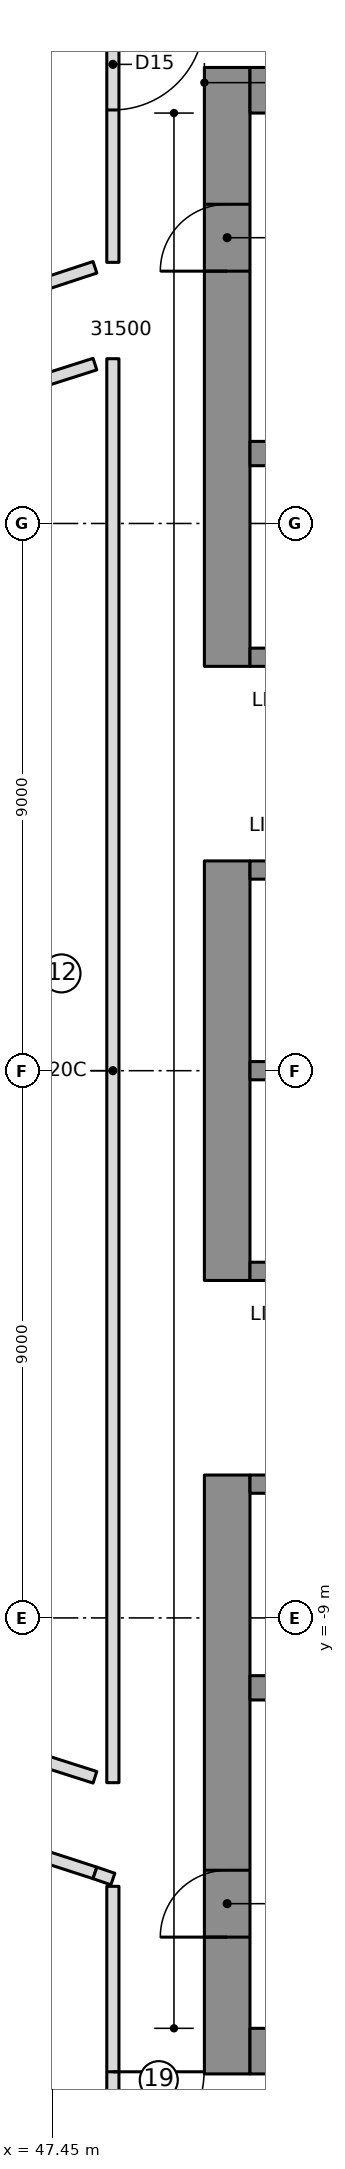
"""IFC4 building model, lengths in metres.
Left out: names, types, materials, properties, quantities, classifications, styles, units other than length and angle.
Written with IfcOpenShell. Run it as: python <this file> out.ifc"""

import sys

from ifc_helpers import new_model, si_unit, direction, frame, frame_2d, origin, place, context, subcontext, project, spatial, rectangle, extrude, element, fill, save


model = new_model("IFC4")
c1 = context("Model", 3, precision=1e-05, world=origin(), true_north=direction((0.0, 1.0)))
c2 = subcontext(c1, "Body", "Model", "MODEL_VIEW")
j1 = project(units=[si_unit("LENGTHUNIT", "METRE"), si_unit("PLANEANGLEUNIT", "RADIAN")], contexts=[c1])
p1 = place(None, origin())
s1 = spatial("IfcSite", under=j1, at=p1, CompositionType="ELEMENT")
p2 = place(p1, origin())
s2 = spatial("IfcBuilding", under=s1, at=p2, CompositionType="ELEMENT")
p3 = place(p2, frame((0.0, 0.0, 182.6)))
s3 = spatial("IfcBuildingStorey", under=s2, at=p3, CompositionType="ELEMENT", Elevation=182.6)
p4 = place(p3, frame((50.325, 6.65, 0.0), z_axis=(0.0, 0.0, 1.0), x_axis=(0.0, 1.0, 0.0)))
e1 = element("IfcWall", 1, at=p4, inside=s3, PredefinedType="SHEAR", context=c2, shape_type="SweptSolid", body=[
    extrude(rectangle(XDim=9.85, YDim=0.75, at=frame_2d((4.925, 0.0))), origin(), (0.0, 0.0, 1.0), 3.55),
])
p5 = place(p4, frame((6.5, 0.0, 0.0)))
e2 = element("IfcOpeningElement", 2, at=p5, cuts=e1, PredefinedType="OPENING", context=c2, shape_type="SweptSolid", body=[
    extrude(rectangle(XDim=1.1, YDim=2.1, at=frame_2d((0.55, 1.05))), frame((0.0, 0.385, 0.0), z_axis=(0.0, -1.0, 0.0), x_axis=(1.0, 0.0, 0.0)), (0.0, 0.0, 1.0), 0.77),
])
p6 = place(p3, frame((50.325, -3.45, 0.0), z_axis=(0.0, 0.0, 1.0), x_axis=(0.0, 1.0, 0.0)))
e3 = element("IfcWall", 3, at=p6, inside=s3, PredefinedType="SHEAR", context=c2, shape_type="SweptSolid", body=[
    extrude(rectangle(XDim=6.9, YDim=0.75, at=frame_2d((3.45, 0.0))), origin(), (0.0, 0.0, 1.0), 3.55),
])
p7 = place(p3, frame((50.325, -16.5, 0.0), z_axis=(0.0, 0.0, 1.0), x_axis=(0.0, 1.0, 0.0)))
e4 = element("IfcWall", 4, at=p7, inside=s3, PredefinedType="SHEAR", context=c2, shape_type="SweptSolid", body=[
    extrude(rectangle(XDim=9.85, YDim=0.75, at=frame_2d((4.925, 0.0))), origin(), (0.0, 0.0, 1.0), 3.55),
])
p8 = place(p7, frame((2.25, 0.0, 0.0)))
e5 = element("IfcOpeningElement", 5, at=p8, cuts=e4, PredefinedType="OPENING", context=c2, shape_type="SweptSolid", body=[
    extrude(rectangle(XDim=1.1, YDim=2.1, at=frame_2d((0.55, 1.05))), frame((0.0, 0.385, 0.0), z_axis=(0.0, -1.0, 0.0), x_axis=(1.0, 0.0, 0.0)), (0.0, 0.0, 1.0), 0.77),
])
for number, where, z_axis, x_axis in (
    (6, (50.7, 16.125, 0.0), (0.0, 0.0, 1.0), (1.0, 0.0, 0.0)),
    (7, (50.7, -16.125, 0.0), (0.0, 0.0, 1.0), (1.0, 0.0, 0.0)),
):
    element("IfcWall", number, at=place(p3, frame(where, z_axis=z_axis, x_axis=x_axis)), inside=s3, PredefinedType="SHEAR", context=c2, shape_type="SweptSolid", body=[
        extrude(rectangle(XDim=13.77, YDim=0.75, at=frame_2d((6.885, 0.0))), origin(), (0.0, 0.0, 1.0), 3.55),
    ])
p9 = place(p3, frame((50.7, 10.15, 0.0), z_axis=(0.0, 0.0, 1.0), x_axis=(1.0, 0.0, 0.0)))
e8 = element("IfcWall", 8, at=p9, inside=s3, PredefinedType="SHEAR", context=c2, shape_type="SweptSolid", body=[
    extrude(rectangle(XDim=13.02, YDim=0.4, at=frame_2d((6.51, 0.0))), origin(), (0.0, 0.0, 1.0), 3.55),
])
p10 = place(p9, frame((0.7, 0.0, 0.0)))
e9 = element("IfcOpeningElement", 9, at=p10, cuts=e8, PredefinedType="OPENING", context=c2, shape_type="SweptSolid", body=[
    extrude(rectangle(XDim=1.1, YDim=2.1, at=frame_2d((0.55, 1.05))), frame((0.0, 0.21, 0.0), z_axis=(0.0, -1.0, 0.0), x_axis=(1.0, 0.0, 0.0)), (0.0, 0.0, 1.0), 0.42),
])
p11 = place(p9, frame((3.5, 0.0, 0.0)))
e10 = element("IfcOpeningElement", 10, at=p11, cuts=e8, PredefinedType="OPENING", context=c2, shape_type="SweptSolid", body=[
    extrude(rectangle(XDim=1.1, YDim=2.1, at=frame_2d((0.55, 1.05))), frame((0.0, 0.21, 0.0), z_axis=(0.0, -1.0, 0.0), x_axis=(1.0, 0.0, 0.0)), (0.0, 0.0, 1.0), 0.42),
])
p12 = place(p3, frame((50.7, -10.15, 0.0), z_axis=(0.0, 0.0, 1.0), x_axis=(1.0, 0.0, 0.0)))
e11 = element("IfcWall", 11, at=p12, inside=s3, PredefinedType="SHEAR", context=c2, shape_type="SweptSolid", body=[
    extrude(rectangle(XDim=13.02, YDim=0.4, at=frame_2d((6.51, 0.0))), origin(), (0.0, 0.0, 1.0), 3.55),
])
p13 = place(p3, frame((50.7, 0.0, 0.0), z_axis=(0.0, 0.0, 1.0), x_axis=(1.0, 0.0, 0.0)))
e12 = element("IfcWall", 12, at=p13, inside=s3, PredefinedType="SHEAR", context=c2, shape_type="SweptSolid", body=[
    extrude(rectangle(XDim=10.9, YDim=0.3, at=frame_2d((5.45, 0.0))), origin(), (0.0, 0.0, 1.0), 3.55),
])
p14 = place(p3, frame((50.7, 3.3, 0.0), z_axis=(0.0, 0.0, 1.0), x_axis=(1.0, 0.0, 0.0)))
e13 = element("IfcWall", 13, at=p14, inside=s3, PredefinedType="SHEAR", context=c2, shape_type="SweptSolid", body=[
    extrude(rectangle(XDim=10.9, YDim=0.3, at=frame_2d((5.45, 0.0))), origin(), (0.0, 0.0, 1.0), 3.55),
])
p15 = place(p14, frame((0.7, 0.0, 0.0)))
e14 = element("IfcOpeningElement", 14, at=p15, cuts=e13, PredefinedType="OPENING", context=c2, shape_type="SweptSolid", body=[
    extrude(rectangle(XDim=1.1, YDim=2.1, at=frame_2d((0.55, 1.05))), frame((0.0, 0.16, 0.0), z_axis=(0.0, -1.0, 0.0), x_axis=(1.0, 0.0, 0.0)), (0.0, 0.0, 1.0), 0.32),
])
p16 = place(p14, frame((3.5, 0.0, 0.0)))
e15 = element("IfcOpeningElement", 15, at=p16, cuts=e13, PredefinedType="OPENING", context=c2, shape_type="SweptSolid", body=[
    extrude(rectangle(XDim=1.1, YDim=2.1, at=frame_2d((0.55, 1.05))), frame((0.0, 0.16, 0.0), z_axis=(0.0, -1.0, 0.0), x_axis=(1.0, 0.0, 0.0)), (0.0, 0.0, 1.0), 0.32),
])
p17 = place(p14, frame((6.3, 0.0, 0.0)))
e16 = element("IfcOpeningElement", 16, at=p17, cuts=e13, PredefinedType="OPENING", context=c2, shape_type="SweptSolid", body=[
    extrude(rectangle(XDim=1.1, YDim=2.1, at=frame_2d((0.55, 1.05))), frame((0.0, 0.16, 0.0), z_axis=(0.0, -1.0, 0.0), x_axis=(1.0, 0.0, 0.0)), (0.0, 0.0, 1.0), 0.32),
])
p18 = place(p14, frame((9.1, 0.0, 0.0)))
e17 = element("IfcOpeningElement", 17, at=p18, cuts=e13, PredefinedType="OPENING", context=c2, shape_type="SweptSolid", body=[
    extrude(rectangle(XDim=1.1, YDim=2.1, at=frame_2d((0.55, 1.05))), frame((0.0, 0.16, 0.0), z_axis=(0.0, -1.0, 0.0), x_axis=(1.0, 0.0, 0.0)), (0.0, 0.0, 1.0), 0.32),
])
p19 = place(p3, frame((50.7, 6.8, 0.0), z_axis=(0.0, 0.0, 1.0), x_axis=(1.0, 0.0, 0.0)))
e18 = element("IfcWall", 18, at=p19, inside=s3, PredefinedType="SHEAR", context=c2, shape_type="SweptSolid", body=[
    extrude(rectangle(XDim=10.9, YDim=0.3, at=frame_2d((5.45, 0.0))), origin(), (0.0, 0.0, 1.0), 3.55),
])
p20 = place(p19, frame((6.4, 0.0, 0.0)))
e19 = element("IfcOpeningElement", 19, at=p20, cuts=e18, PredefinedType="OPENING", context=c2, shape_type="SweptSolid", body=[
    extrude(rectangle(XDim=0.9, YDim=2.1, at=frame_2d((0.45, 1.05))), frame((0.0, 0.16, 0.0), z_axis=(0.0, -1.0, 0.0), x_axis=(1.0, 0.0, 0.0)), (0.0, 0.0, 1.0), 0.32),
])
p21 = place(p19, frame((9.2, 0.0, 0.0)))
e20 = element("IfcOpeningElement", 20, at=p21, cuts=e18, PredefinedType="OPENING", context=c2, shape_type="SweptSolid", body=[
    extrude(rectangle(XDim=0.9, YDim=2.1, at=frame_2d((0.45, 1.05))), frame((0.0, 0.16, 0.0), z_axis=(0.0, -1.0, 0.0), x_axis=(1.0, 0.0, 0.0)), (0.0, 0.0, 1.0), 0.32),
])
p22 = place(p3, frame((50.7, -3.3, 0.0), z_axis=(0.0, 0.0, 1.0), x_axis=(1.0, 0.0, 0.0)))
e21 = element("IfcWall", 21, at=p22, inside=s3, PredefinedType="SHEAR", context=c2, shape_type="SweptSolid", body=[
    extrude(rectangle(XDim=10.9, YDim=0.3, at=frame_2d((5.45, 0.0))), origin(), (0.0, 0.0, 1.0), 3.55),
])
p23 = place(p22, frame((9.1, 0.0, 0.0)))
e22 = element("IfcOpeningElement", 22, at=p23, cuts=e21, PredefinedType="OPENING", context=c2, shape_type="SweptSolid", body=[
    extrude(rectangle(XDim=1.1, YDim=2.1, at=frame_2d((0.55, 1.05))), frame((0.0, 0.16, 0.0), z_axis=(0.0, -1.0, 0.0), x_axis=(1.0, 0.0, 0.0)), (0.0, 0.0, 1.0), 0.32),
])
p24 = place(p3, frame((50.7, -6.8, 0.0), z_axis=(0.0, 0.0, 1.0), x_axis=(1.0, 0.0, 0.0)))
e23 = element("IfcWall", 23, at=p24, inside=s3, PredefinedType="SHEAR", context=c2, shape_type="SweptSolid", body=[
    extrude(rectangle(XDim=10.9, YDim=0.3, at=frame_2d((5.45, 0.0))), origin(), (0.0, 0.0, 1.0), 3.55),
])
p25 = place(p24, frame((6.3, 0.0, 0.0)))
e24 = element("IfcOpeningElement", 24, at=p25, cuts=e23, PredefinedType="OPENING", context=c2, shape_type="SweptSolid", body=[
    extrude(rectangle(XDim=1.1, YDim=2.1, at=frame_2d((0.55, 1.05))), frame((0.0, 0.16, 0.0), z_axis=(0.0, -1.0, 0.0), x_axis=(1.0, 0.0, 0.0)), (0.0, 0.0, 1.0), 0.32),
])
p26 = place(p24, frame((9.1, 0.0, 0.0)))
e25 = element("IfcOpeningElement", 25, at=p26, cuts=e23, PredefinedType="OPENING", context=c2, shape_type="SweptSolid", body=[
    extrude(rectangle(XDim=1.1, YDim=2.1, at=frame_2d((0.55, 1.05))), frame((0.0, 0.16, 0.0), z_axis=(0.0, -1.0, 0.0), x_axis=(1.0, 0.0, 0.0)), (0.0, 0.0, 1.0), 0.32),
])
p27 = place(p24, frame((0.8, 0.0, 0.0)))
e26 = element("IfcOpeningElement", 26, at=p27, cuts=e23, PredefinedType="OPENING", context=c2, shape_type="SweptSolid", body=[
    extrude(rectangle(XDim=0.9, YDim=2.1, at=frame_2d((0.45, 1.05))), frame((0.0, 0.16, 0.0), z_axis=(0.0, -1.0, 0.0), x_axis=(1.0, 0.0, 0.0)), (0.0, 0.0, 1.0), 0.32),
])
p28 = place(p24, frame((3.6, 0.0, 0.0)))
e27 = element("IfcOpeningElement", 27, at=p28, cuts=e23, PredefinedType="OPENING", context=c2, shape_type="SweptSolid", body=[
    extrude(rectangle(XDim=0.9, YDim=2.1, at=frame_2d((0.45, 1.05))), frame((0.0, 0.16, 0.0), z_axis=(0.0, -1.0, 0.0), x_axis=(1.0, 0.0, 0.0)), (0.0, 0.0, 1.0), 0.32),
])
p29 = place(p3, frame((48.15, 13.213, 0.0), z_axis=(0.0, 0.0, 1.0), x_axis=(-0.949729856115, -0.313070599711, 0.0)))
e28 = element("IfcWall", 28, at=p29, inside=s3, PredefinedType="PARTITIONING", context=c2, shape_type="SweptSolid", body=[
    extrude(rectangle(XDim=3.853, YDim=0.2, at=frame_2d((1.927, 0.0))), origin(), (0.0, 0.0, 1.0), 3.25),
])
p30 = place(p3, frame((44.49, -12.007, 0.0), z_axis=(0.0, 0.0, 1.0), x_axis=(0.951228355446, -0.308487626648, 0.0)))
e29 = element("IfcWall", 29, at=p30, inside=s3, PredefinedType="PARTITIONING", context=c2, shape_type="SweptSolid", body=[
    extrude(rectangle(XDim=3.847, YDim=0.2, at=frame_2d((1.924, 0.0))), origin(), (0.0, 0.0, 1.0), 3.25),
])
for number, where, z_axis, x_axis in (
    (30, (46.881, 11.217, 0.0), (0.0, 0.0, 1.0), (0.953, 0.304, 0.0)),
    (31, (48.15, -11.621, 0.0), (0.0, 0.0, 1.0), (-0.953, 0.304, 0.0)),
):
    element("IfcWall", number, at=place(p3, frame(where, z_axis=z_axis, x_axis=x_axis)), inside=s3, PredefinedType="PARTITIONING", context=c2, shape_type="SweptSolid", body=[
        extrude(rectangle(XDim=1.332, YDim=0.2, at=frame_2d((0.666, 0.0))), origin(), (0.0, 0.0, 1.0), 3.25),
    ])
p31 = place(p3, frame((48.445, 11.71, 0.0), z_axis=(0.0, 0.0, 1.0), x_axis=(0.0, -1.0, 0.0)))
e32 = element("IfcWall", 32, at=p31, inside=s3, PredefinedType="PARTITIONING", context=c2, shape_type="SweptSolid", body=[
    extrude(rectangle(XDim=23.42, YDim=0.2, at=frame_2d((11.71, 0.0))), origin(), (0.0, 0.0, 1.0), 3.25),
])
p32 = place(p3, frame((48.445, 20.351, 0.0), z_axis=(0.0, 0.0, 1.0), x_axis=(0.0, -1.0, 0.0)))
e33 = element("IfcWall", 33, at=p32, inside=s3, PredefinedType="PARTITIONING", context=c2, shape_type="SweptSolid", body=[
    extrude(rectangle(XDim=7.056, YDim=0.2, at=frame_2d((3.528, 0.0))), origin(), (0.0, 0.0, 1.0), 3.25),
])
p33 = place(p32, frame((3.05, 0.0, 0.0)))
e34 = element("IfcOpeningElement", 34, at=p33, cuts=e33, PredefinedType="OPENING", context=c2, shape_type="SweptSolid", body=[
    extrude(rectangle(XDim=1.5, YDim=2.1, at=frame_2d((0.75, 1.05))), frame((0.0, 0.11, 0.0), z_axis=(0.0, -1.0, 0.0), x_axis=(1.0, 0.0, 0.0)), (0.0, 0.0, 1.0), 0.22),
])
p34 = place(p3, frame((48.15, -13.194, 0.0), z_axis=(0.0, 0.0, 1.0), x_axis=(0.946069343286, -0.323964191994, 0.0)))
e35 = element("IfcWall", 35, at=p34, inside=s3, PredefinedType="PARTITIONING", context=c2, shape_type="SweptSolid", body=[
    extrude(rectangle(XDim=0.312, YDim=0.2, at=frame_2d((0.156, 0.0))), origin(), (0.0, 0.0, 1.0), 3.25),
])
p35 = place(p3, frame((48.445, -13.415, 0.0), z_axis=(0.0, 0.0, 1.0), x_axis=(0.0, -1.0, 0.0)))
e36 = element("IfcWall", 36, at=p35, inside=s3, PredefinedType="PARTITIONING", context=c2, shape_type="SweptSolid", body=[
    extrude(rectangle(XDim=6.936, YDim=0.2, at=frame_2d((3.468, 0.0))), origin(), (0.0, 0.0, 1.0), 3.25),
])
p36 = place(p35, frame((3.05, 0.0, 0.0)))
e37 = element("IfcOpeningElement", 37, at=p36, cuts=e36, PredefinedType="OPENING", context=c2, shape_type="SweptSolid", body=[
    extrude(rectangle(XDim=1.5, YDim=2.1, at=frame_2d((0.75, 1.05))), frame((0.0, 0.11, 0.0), z_axis=(0.0, -1.0, 0.0), x_axis=(1.0, 0.0, 0.0)), (0.0, 0.0, 1.0), 0.22),
])
p37 = place(p33, origin())
e38 = element("IfcDoor", 38, at=p37, inside=s3, OperationType="DOUBLE_DOOR_SINGLE_SWING", PredefinedType="DOOR", context=c2, shape_type="SweptSolid", body=[
    extrude(rectangle(XDim=1.5, YDim=2.1, at=frame_2d((0.75, 1.05))), frame((0.0, 0.025, 0.0), z_axis=(0.0, -1.0, 0.0), x_axis=(1.0, 0.0, 0.0)), (0.0, 0.0, 1.0), 0.05),
])
fill(e34, e38)
p38 = place(p36, origin())
e39 = element("IfcDoor", 39, at=p38, inside=s3, OperationType="DOUBLE_DOOR_SINGLE_SWING", PredefinedType="DOOR", context=c2, shape_type="SweptSolid", body=[
    extrude(rectangle(XDim=1.5, YDim=2.1, at=frame_2d((0.75, 1.05))), frame((0.0, 0.025, 0.0), z_axis=(0.0, -1.0, 0.0), x_axis=(1.0, 0.0, 0.0)), (0.0, 0.0, 1.0), 0.05),
])
fill(e37, e39)
p39 = place(p5, origin())
e40 = element("IfcDoor", 40, at=p39, inside=s3, OperationType="SINGLE_SWING_RIGHT", PredefinedType="DOOR", context=c2, shape_type="SweptSolid", body=[
    extrude(rectangle(XDim=1.1, YDim=2.1, at=frame_2d((0.55, 1.05))), frame((0.0, 0.025, 0.0), z_axis=(0.0, -1.0, 0.0), x_axis=(1.0, 0.0, 0.0)), (0.0, 0.0, 1.0), 0.05),
])
fill(e2, e40)
p40 = place(p8, origin())
e41 = element("IfcDoor", 41, at=p40, inside=s3, OperationType="SINGLE_SWING_RIGHT", PredefinedType="DOOR", context=c2, shape_type="SweptSolid", body=[
    extrude(rectangle(XDim=1.1, YDim=2.1, at=frame_2d((0.55, 1.05))), frame((0.0, 0.025, 0.0), z_axis=(0.0, -1.0, 0.0), x_axis=(1.0, 0.0, 0.0)), (0.0, 0.0, 1.0), 0.05),
])
fill(e5, e41)
save(model, sys.argv[1])
